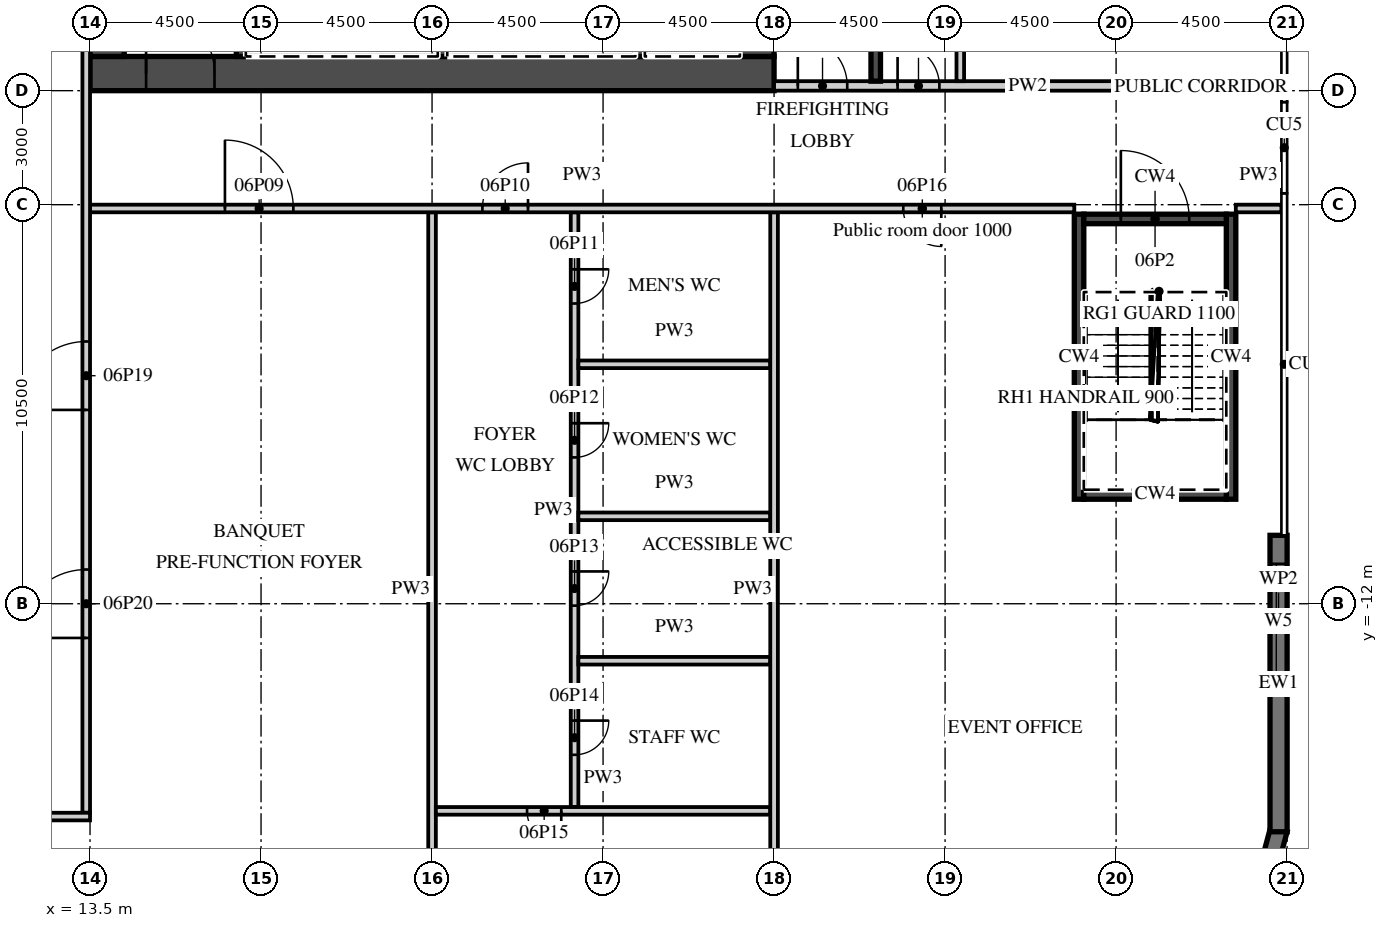
"""IFC4 building model, lengths in metres.
Left out: names, types, materials, properties, quantities, classifications, styles, units other than length and angle.
Written with IfcOpenShell. Run it as: python <this file> out.ifc"""

import sys

from ifc_helpers import new_model, si_unit, direction, frame, frame_2d, origin, place, context, subcontext, project, spatial, polyline, rectangle, outline, extrude, element, fill, save


model = new_model("IFC4")
c1 = context("Model", 3, precision=1e-05, world=origin(), true_north=direction((0.0, 1.0)))
c2 = subcontext(c1, "Body", "Model", "MODEL_VIEW")
j1 = project(units=[si_unit("LENGTHUNIT", "METRE"), si_unit("PLANEANGLEUNIT", "RADIAN")], contexts=[c1])
p1 = place(None, origin())
s1 = spatial("IfcSite", under=j1, at=p1, CompositionType="ELEMENT")
p2 = place(p1, origin())
s2 = spatial("IfcBuilding", under=s1, at=p2, CompositionType="ELEMENT")
p3 = place(p2, frame((0.0, 0.0, 38.0)))
s3 = spatial("IfcBuildingStorey", under=s2, at=p3, CompositionType="ELEMENT", Elevation=38.0)
p4 = place(p3, frame((44.247, -19.942, 0.0), z_axis=(0.0, 0.0, 1.0), x_axis=(0.25881466832, 0.965926999034, 0.0)))
e1 = element("IfcWall", 1, at=p4, inside=s3, PredefinedType="SOLIDWALL", context=c2, shape_type="SweptSolid", body=[
    extrude(outline(polyline([(-0.0, -0.225), (2.07, -0.225), (1.95, 0.225), (0.12, 0.225), (-0.0, -0.225)])), origin(), (0.0, 0.0, 1.0), 8.7),
])
p5 = place(p3, frame((44.775, -18.0, 0.0), z_axis=(0.0, 0.0, 1.0), x_axis=(0.0, 1.0, 0.0)))
e2 = element("IfcWall", 2, at=p5, inside=s3, PredefinedType="SOLIDWALL", context=c2, shape_type="SweptSolid", body=[
    extrude(rectangle(XDim=7.8, YDim=0.45, at=frame_2d((3.9, 0.0))), origin(), (0.0, 0.0, 1.0), 8.7),
])
p6 = place(p5, frame((4.05, 0.0, 0.9)))
e3 = element("IfcOpeningElement", 3, at=p6, cuts=e2, PredefinedType="OPENING", context=c2, shape_type="SweptSolid", body=[
    extrude(rectangle(XDim=3.0, YDim=1.8, at=frame_2d((1.5, 0.9))), frame((0.0, 0.235, 0.0), z_axis=(0.0, -1.0, 0.0), x_axis=(1.0, 0.0, 0.0)), (0.0, 0.0, 1.0), 0.47),
])
p7 = place(p3, frame((13.5, 1.95, 0.0), z_axis=(0.0, 0.0, 1.0), x_axis=(1.0, 0.0, 0.0)))
e4 = element("IfcWall", 4, at=p7, inside=s3, PredefinedType="SHEAR", context=c2, shape_type="SweptSolid", body=[
    extrude(rectangle(XDim=18.0, YDim=0.9, at=frame_2d((9.0, 0.0))), origin(), (0.0, 0.0, 1.0), 8.7),
])
p8 = place(p7, frame((1.475, 0.0, 0.0)))
e5 = element("IfcOpeningElement", 5, at=p8, cuts=e4, PredefinedType="OPENING", context=c2, shape_type="SweptSolid", body=[
    extrude(rectangle(XDim=1.8, YDim=2.1, at=frame_2d((0.9, 1.05))), frame((0.0, 0.46, 0.0), z_axis=(0.0, -1.0, 0.0), x_axis=(1.0, 0.0, 0.0)), (0.0, 0.0, 1.0), 0.92),
])
p9 = place(p3, frame((31.05, 2.4, 0.0), z_axis=(0.0, 0.0, 1.0), x_axis=(0.0, 1.0, 0.0)))
e6 = element("IfcWall", 6, at=p9, inside=s3, PredefinedType="SHEAR", context=c2, shape_type="SweptSolid", body=[
    extrude(rectangle(XDim=12.8, YDim=0.9, at=frame_2d((6.4, 0.0))), origin(), (0.0, 0.0, 1.0), 8.7),
])
p10 = place(p9, frame((0.2, 0.0, 0.0)))
e7 = element("IfcOpeningElement", 7, at=p10, cuts=e6, PredefinedType="OPENING", context=c2, shape_type="SweptSolid", body=[
    extrude(rectangle(XDim=1.1, YDim=2.1, at=frame_2d((0.55, 1.05))), frame((0.0, 0.46, 0.0), z_axis=(0.0, -1.0, 0.0), x_axis=(1.0, 0.0, 0.0)), (0.0, 0.0, 1.0), 0.92),
])
p11 = place(p3, frame((13.95, 2.4, 0.0), z_axis=(0.0, 0.0, 1.0), x_axis=(0.0, 1.0, 0.0)))
e8 = element("IfcWall", 8, at=p11, inside=s3, PredefinedType="SHEAR", context=c2, shape_type="SweptSolid", body=[
    extrude(rectangle(XDim=12.2, YDim=0.9, at=frame_2d((6.1, 0.0))), origin(), (0.0, 0.0, 1.0), 8.7),
])
p12 = place(p3, frame((17.475, 2.4, 0.0), z_axis=(0.0, 0.0, 1.0), x_axis=(0.0, 1.0, 0.0)))
e9 = element("IfcWall", 9, at=p12, inside=s3, PredefinedType="SHEAR", context=c2, shape_type="SweptSolid", body=[
    extrude(rectangle(XDim=3.15, YDim=0.25, at=frame_2d((1.575, 0.0))), origin(), (0.0, 0.0, 1.0), 8.7),
])
for number, where, z_axis, x_axis in (
    (10, (27.975, 2.4, 0.0), (0.0, 0.0, 1.0), (0.0, 1.0, 0.0)),
    (11, (22.775, 2.4, 0.0), (0.0, 0.0, 1.0), (0.0, 1.0, 0.0)),
):
    element("IfcWall", number, at=place(p3, frame(where, z_axis=z_axis, x_axis=x_axis)), inside=s3, PredefinedType="SHEAR", context=c2, shape_type="SweptSolid", body=[
        extrude(rectangle(XDim=2.9, YDim=0.25, at=frame_2d((1.45, 0.0))), origin(), (0.0, 0.0, 1.0), 8.7),
    ])
p13 = place(p3, frame((31.5, 1.625, 0.0), z_axis=(0.0, 0.0, 1.0), x_axis=(1.0, 0.0, 0.0)))
e12 = element("IfcWall", 12, at=p13, inside=s3, PredefinedType="PARTITIONING", context=c2, shape_type="SweptSolid", body=[
    extrude(rectangle(XDim=13.35, YDim=0.25, at=frame_2d((6.675, 0.0))), origin(), (0.0, 0.0, 1.0), 8.7),
])
p14 = place(p13, frame((0.625, 0.0, 0.0)))
e13 = element("IfcOpeningElement", 13, at=p14, cuts=e12, PredefinedType="OPENING", context=c2, shape_type="SweptSolid", body=[
    extrude(rectangle(XDim=1.3, YDim=2.1, at=frame_2d((0.65, 1.05))), frame((0.0, 0.135, 0.0), z_axis=(0.0, -1.0, 0.0), x_axis=(1.0, 0.0, 0.0)), (0.0, 0.0, 1.0), 0.27),
])
p15 = place(p13, frame((3.25, 0.0, 0.0)))
e14 = element("IfcOpeningElement", 14, at=p15, cuts=e12, PredefinedType="OPENING", context=c2, shape_type="SweptSolid", body=[
    extrude(rectangle(XDim=1.1, YDim=2.1, at=frame_2d((0.55, 1.05))), frame((0.0, 0.135, 0.0), z_axis=(0.0, -1.0, 0.0), x_axis=(1.0, 0.0, 0.0)), (0.0, 0.0, 1.0), 0.27),
])
p16 = place(p3, frame((34.175, 1.75, 0.0), z_axis=(0.0, 0.0, 1.0), x_axis=(0.0, 1.0, 0.0)))
e15 = element("IfcWall", 15, at=p16, inside=s3, PredefinedType="SHEAR", context=c2, shape_type="SweptSolid", body=[
    extrude(rectangle(XDim=8.35, YDim=0.25, at=frame_2d((4.175, 0.0))), origin(), (0.0, 0.0, 1.0), 8.7),
])
p17 = place(p3, frame((36.4, 1.75, 0.0), z_axis=(0.0, 0.0, 1.0), x_axis=(0.0, 1.0, 0.0)))
e16 = element("IfcWall", 16, at=p17, inside=s3, PredefinedType="PARTITIONING", context=c2, shape_type="SweptSolid", body=[
    extrude(rectangle(XDim=15.95, YDim=0.2, at=frame_2d((7.975, 0.0))), origin(), (0.0, 0.0, 1.0), 8.7),
])
p18 = place(p17, frame((14.7, 0.0, 0.0)))
e17 = element("IfcOpeningElement", 17, at=p18, cuts=e16, PredefinedType="OPENING", context=c2, shape_type="SweptSolid", body=[
    extrude(rectangle(XDim=0.9, YDim=2.1, at=frame_2d((0.45, 1.05))), frame((0.0, 0.11, 0.0), z_axis=(0.0, -1.0, 0.0), x_axis=(1.0, 0.0, 0.0)), (0.0, 0.0, 1.0), 0.22),
])
for number, where, z_axis, x_axis in (
    (18, (39.525, -9.25, 0.0), (0.0, 0.0, 1.0), (0.0, 1.0, 0.0)),
    (19, (43.525, -9.25, 0.0), (0.0, 0.0, 1.0), (0.0, 1.0, 0.0)),
):
    element("IfcWall", number, at=place(p3, frame(where, z_axis=z_axis, x_axis=x_axis)), inside=s3, PredefinedType="SHEAR", context=c2, shape_type="SweptSolid", body=[
        extrude(rectangle(XDim=7.5, YDim=0.25, at=frame_2d((3.75, 0.0))), origin(), (0.0, 0.0, 1.0), 8.7),
    ])
p19 = place(p3, frame((39.65, -9.125, 0.0), z_axis=(0.0, 0.0, 1.0), x_axis=(1.0, 0.0, 0.0)))
e20 = element("IfcWall", 20, at=p19, inside=s3, PredefinedType="SHEAR", context=c2, shape_type="SweptSolid", body=[
    extrude(rectangle(XDim=3.75, YDim=0.25, at=frame_2d((1.875, 0.0))), origin(), (0.0, 0.0, 1.0), 8.7),
])
p20 = place(p3, frame((39.65, -1.875, 0.0), z_axis=(0.0, 0.0, 1.0), x_axis=(1.0, 0.0, 0.0)))
e21 = element("IfcWall", 21, at=p20, inside=s3, PredefinedType="SHEAR", context=c2, shape_type="SweptSolid", body=[
    extrude(rectangle(XDim=3.75, YDim=0.25, at=frame_2d((1.875, 0.0))), origin(), (0.0, 0.0, 1.0), 8.7),
])
p21 = place(p20, frame((0.975, 0.0, 0.0)))
e22 = element("IfcOpeningElement", 22, at=p21, cuts=e21, PredefinedType="OPENING", context=c2, shape_type="SweptSolid", body=[
    extrude(rectangle(XDim=1.8, YDim=2.1, at=frame_2d((0.9, 1.05))), frame((0.0, 0.135, 0.0), z_axis=(0.0, -1.0, 0.0), x_axis=(1.0, 0.0, 0.0)), (0.0, 0.0, 1.0), 0.27),
])
p22 = place(p3, frame((22.5, -21.55, 0.0), z_axis=(0.0, 0.0, 1.0), x_axis=(0.0, 1.0, 0.0)))
e23 = element("IfcWall", 23, at=p22, inside=s3, PredefinedType="PARTITIONING", context=c2, shape_type="SweptSolid", body=[
    extrude(rectangle(XDim=19.85, YDim=0.2, at=frame_2d((9.925, 0.0))), origin(), (0.0, 0.0, 1.0), 8.7),
])
p23 = place(p3, frame((26.25, -17.35, 0.0), z_axis=(0.0, 0.0, 1.0), x_axis=(0.0, 1.0, 0.0)))
e24 = element("IfcWall", 24, at=p23, inside=s3, PredefinedType="PARTITIONING", context=c2, shape_type="SweptSolid", body=[
    extrude(rectangle(XDim=15.65, YDim=0.2, at=frame_2d((7.825, 0.0))), origin(), (0.0, 0.0, 1.0), 8.7),
])
p24 = place(p23, frame((13.25, 0.0, 0.0)))
e25 = element("IfcOpeningElement", 25, at=p24, cuts=e24, PredefinedType="OPENING", context=c2, shape_type="SweptSolid", body=[
    extrude(rectangle(XDim=0.9, YDim=2.1, at=frame_2d((0.45, 1.05))), frame((0.0, 0.11, 0.0), z_axis=(0.0, -1.0, 0.0), x_axis=(1.0, 0.0, 0.0)), (0.0, 0.0, 1.0), 0.22),
])
p25 = place(p23, frame((9.2, 0.0, 0.0)))
e26 = element("IfcOpeningElement", 26, at=p25, cuts=e24, PredefinedType="OPENING", context=c2, shape_type="SweptSolid", body=[
    extrude(rectangle(XDim=0.9, YDim=2.1, at=frame_2d((0.45, 1.05))), frame((0.0, 0.11, 0.0), z_axis=(0.0, -1.0, 0.0), x_axis=(1.0, 0.0, 0.0)), (0.0, 0.0, 1.0), 0.22),
])
p26 = place(p23, frame((5.3, 0.0, 0.0)))
e27 = element("IfcOpeningElement", 27, at=p26, cuts=e24, PredefinedType="OPENING", context=c2, shape_type="SweptSolid", body=[
    extrude(rectangle(XDim=0.9, YDim=2.1, at=frame_2d((0.45, 1.05))), frame((0.0, 0.11, 0.0), z_axis=(0.0, -1.0, 0.0), x_axis=(1.0, 0.0, 0.0)), (0.0, 0.0, 1.0), 0.22),
])
p27 = place(p23, frame((1.375, 0.0, 0.0)))
e28 = element("IfcOpeningElement", 28, at=p27, cuts=e24, PredefinedType="OPENING", context=c2, shape_type="SweptSolid", body=[
    extrude(rectangle(XDim=0.9, YDim=2.1, at=frame_2d((0.45, 1.05))), frame((0.0, 0.11, 0.0), z_axis=(0.0, -1.0, 0.0), x_axis=(1.0, 0.0, 0.0)), (0.0, 0.0, 1.0), 0.22),
])
for number, where, z_axis, x_axis in (
    (29, (26.35, -5.7, 0.0), (0.0, 0.0, 1.0), (1.0, 0.0, 0.0)),
    (30, (26.35, -9.7, 0.0), (0.0, 0.0, 1.0), (1.0, 0.0, 0.0)),
    (31, (26.35, -13.5, 0.0), (0.0, 0.0, 1.0), (1.0, 0.0, 0.0)),
):
    element("IfcWall", number, at=place(p3, frame(where, z_axis=z_axis, x_axis=x_axis)), inside=s3, PredefinedType="PARTITIONING", context=c2, shape_type="SweptSolid", body=[
        extrude(rectangle(XDim=5.05, YDim=0.2, at=frame_2d((2.525, 0.0))), origin(), (0.0, 0.0, 1.0), 8.7),
    ])
p28 = place(p3, frame((22.6, -17.45, 0.0), z_axis=(0.0, 0.0, 1.0), x_axis=(1.0, 0.0, 0.0)))
e32 = element("IfcWall", 32, at=p28, inside=s3, PredefinedType="PARTITIONING", context=c2, shape_type="SweptSolid", body=[
    extrude(rectangle(XDim=8.8, YDim=0.2, at=frame_2d((4.4, 0.0))), origin(), (0.0, 0.0, 1.0), 8.7),
])
p29 = place(p28, frame((2.4, 0.0, 0.0)))
e33 = element("IfcOpeningElement", 33, at=p29, cuts=e32, PredefinedType="OPENING", context=c2, shape_type="SweptSolid", body=[
    extrude(rectangle(XDim=0.9, YDim=2.1, at=frame_2d((0.45, 1.05))), frame((0.0, 0.11, 0.0), z_axis=(0.0, -1.0, 0.0), x_axis=(1.0, 0.0, 0.0)), (0.0, 0.0, 1.0), 0.22),
])
p30 = place(p3, frame((31.5, -21.55, 0.0), z_axis=(0.0, 0.0, 1.0), x_axis=(0.0, 1.0, 0.0)))
e34 = element("IfcWall", 34, at=p30, inside=s3, PredefinedType="PARTITIONING", context=c2, shape_type="SweptSolid", body=[
    extrude(rectangle(XDim=19.85, YDim=0.2, at=frame_2d((9.925, 0.0))), origin(), (0.0, 0.0, 1.0), 8.7),
])
p31 = place(p3, frame((13.5, -1.6, 0.0), z_axis=(0.0, 0.0, 1.0), x_axis=(1.0, 0.0, 0.0)))
e35 = element("IfcWall", 35, at=p31, inside=s3, PredefinedType="PARTITIONING", context=c2, shape_type="SweptSolid", body=[
    extrude(rectangle(XDim=25.9, YDim=0.2, at=frame_2d((12.95, 0.0))), origin(), (0.0, 0.0, 1.0), 8.7),
])
p32 = place(p31, frame((3.55, 0.0, 0.0)))
e36 = element("IfcOpeningElement", 36, at=p32, cuts=e35, PredefinedType="OPENING", context=c2, shape_type="SweptSolid", body=[
    extrude(rectangle(XDim=1.8, YDim=2.1, at=frame_2d((0.9, 1.05))), frame((0.0, 0.11, 0.0), z_axis=(0.0, -1.0, 0.0), x_axis=(1.0, 0.0, 0.0)), (0.0, 0.0, 1.0), 0.22),
])
p33 = place(p31, frame((10.325, 0.0, 0.0)))
e37 = element("IfcOpeningElement", 37, at=p33, cuts=e35, PredefinedType="OPENING", context=c2, shape_type="SweptSolid", body=[
    extrude(rectangle(XDim=1.2, YDim=2.1, at=frame_2d((0.6, 1.05))), frame((0.0, 0.11, 0.0), z_axis=(0.0, -1.0, 0.0), x_axis=(1.0, 0.0, 0.0)), (0.0, 0.0, 1.0), 0.22),
])
p34 = place(p31, frame((21.4, 0.0, 0.0)))
e38 = element("IfcOpeningElement", 38, at=p34, cuts=e35, PredefinedType="OPENING", context=c2, shape_type="SweptSolid", body=[
    extrude(rectangle(XDim=1.0, YDim=2.1, at=frame_2d((0.5, 1.05))), frame((0.0, 0.11, 0.0), z_axis=(0.0, -1.0, 0.0), x_axis=(1.0, 0.0, 0.0)), (0.0, 0.0, 1.0), 0.22),
])
p35 = place(p3, frame((43.65, -1.6, 0.0), z_axis=(0.0, 0.0, 1.0), x_axis=(1.0, 0.0, 0.0)))
e39 = element("IfcWall", 39, at=p35, inside=s3, PredefinedType="PARTITIONING", context=c2, shape_type="SweptSolid", body=[
    extrude(rectangle(XDim=1.2, YDim=0.2, at=frame_2d((0.6, 0.0))), origin(), (0.0, 0.0, 1.0), 8.7),
])
p36 = place(p3, frame((13.4, -17.5, 0.0), z_axis=(0.0, 0.0, 1.0), x_axis=(0.0, 1.0, 0.0)))
e40 = element("IfcWall", 40, at=p36, inside=s3, PredefinedType="PARTITIONING", context=c2, shape_type="SweptSolid", body=[
    extrude(rectangle(XDim=35.0, YDim=0.2, at=frame_2d((17.5, 0.0))), origin(), (0.0, 0.0, 1.0), 8.7),
])
p37 = place(p36, frame((10.6, 0.0, 0.0)))
e41 = element("IfcOpeningElement", 41, at=p37, cuts=e40, PredefinedType="OPENING", context=c2, shape_type="SweptSolid", body=[
    extrude(rectangle(XDim=1.8, YDim=2.1, at=frame_2d((0.9, 1.05))), frame((0.0, 0.11, 0.0), z_axis=(0.0, -1.0, 0.0), x_axis=(1.0, 0.0, 0.0)), (0.0, 0.0, 1.0), 0.22),
])
p38 = place(p36, frame((4.6, 0.0, 0.0)))
e42 = element("IfcOpeningElement", 42, at=p38, cuts=e40, PredefinedType="OPENING", context=c2, shape_type="SweptSolid", body=[
    extrude(rectangle(XDim=1.8, YDim=2.1, at=frame_2d((0.9, 1.05))), frame((0.0, 0.11, 0.0), z_axis=(0.0, -1.0, 0.0), x_axis=(1.0, 0.0, 0.0)), (0.0, 0.0, 1.0), 0.22),
])
p39 = place(p3, frame((-13.5, -17.6, 0.0), z_axis=(0.0, 0.0, 1.0), x_axis=(1.0, 0.0, 0.0)))
e43 = element("IfcWall", 43, at=p39, inside=s3, PredefinedType="PARTITIONING", context=c2, shape_type="SweptSolid", body=[
    extrude(rectangle(XDim=27.0, YDim=0.2, at=frame_2d((13.5, 0.0))), origin(), (0.0, 0.0, 1.0), 8.7),
])
p40 = place(p39, frame((4.6, 0.0, 0.0)))
e44 = element("IfcOpeningElement", 44, at=p40, cuts=e43, PredefinedType="OPENING", context=c2, shape_type="SweptSolid", body=[
    extrude(rectangle(XDim=1.8, YDim=2.1, at=frame_2d((0.9, 1.05))), frame((0.0, 0.11, 0.0), z_axis=(0.0, -1.0, 0.0), x_axis=(1.0, 0.0, 0.0)), (0.0, 0.0, 1.0), 0.22),
])
p41 = place(p39, frame((12.6, 0.0, 0.0)))
e45 = element("IfcOpeningElement", 45, at=p41, cuts=e43, PredefinedType="OPENING", context=c2, shape_type="SweptSolid", body=[
    extrude(rectangle(XDim=1.8, YDim=2.1, at=frame_2d((0.9, 1.05))), frame((0.0, 0.11, 0.0), z_axis=(0.0, -1.0, 0.0), x_axis=(1.0, 0.0, 0.0)), (0.0, 0.0, 1.0), 0.22),
])
p42 = place(p39, frame((20.6, 0.0, 0.0)))
e46 = element("IfcOpeningElement", 46, at=p42, cuts=e43, PredefinedType="OPENING", context=c2, shape_type="SweptSolid", body=[
    extrude(rectangle(XDim=1.8, YDim=2.1, at=frame_2d((0.9, 1.05))), frame((0.0, 0.11, 0.0), z_axis=(0.0, -1.0, 0.0), x_axis=(1.0, 0.0, 0.0)), (0.0, 0.0, 1.0), 0.22),
])
p43 = place(p6, origin())
e47 = element("IfcWindow", 47, at=p43, inside=s3, PartitioningType="SINGLE_PANEL", PredefinedType="WINDOW", context=c2, shape_type="SweptSolid", body=[
    extrude(rectangle(XDim=3.0, YDim=1.8, at=frame_2d((1.5, 0.9))), frame((0.0, 0.09, 0.0), z_axis=(0.0, -1.0, 0.0), x_axis=(1.0, 0.0, 0.0)), (0.0, 0.0, 1.0), 0.06),
])
fill(e3, e47)
p44 = place(p8, origin())
e48 = element("IfcDoor", 48, at=p44, inside=s3, OperationType="DOUBLE_DOOR_DOUBLE_SWING", PredefinedType="DOOR", context=c2, shape_type="SweptSolid", body=[
    extrude(rectangle(XDim=1.8, YDim=2.1, at=frame_2d((0.9, 1.05))), frame((0.0, 0.025, 0.0), z_axis=(0.0, -1.0, 0.0), x_axis=(1.0, 0.0, 0.0)), (0.0, 0.0, 1.0), 0.05),
])
fill(e5, e48)
p45 = place(p14, origin())
e49 = element("IfcDoor", 49, at=p45, inside=s3, OperationType="SINGLE_SWING_LEFT", PredefinedType="DOOR", context=c2, shape_type="SweptSolid", body=[
    extrude(rectangle(XDim=1.3, YDim=2.1, at=frame_2d((0.65, 1.05))), frame((0.0, 0.025, 0.0), z_axis=(0.0, -1.0, 0.0), x_axis=(1.0, 0.0, 0.0)), (0.0, 0.0, 1.0), 0.05),
])
fill(e13, e49)
p46 = place(p15, origin())
e50 = element("IfcDoor", 50, at=p46, inside=s3, OperationType="SINGLE_SWING_LEFT", PredefinedType="DOOR", context=c2, shape_type="SweptSolid", body=[
    extrude(rectangle(XDim=1.1, YDim=2.1, at=frame_2d((0.55, 1.05))), frame((0.0, 0.025, 0.0), z_axis=(0.0, -1.0, 0.0), x_axis=(1.0, 0.0, 0.0)), (0.0, 0.0, 1.0), 0.05),
])
fill(e14, e50)
p47 = place(p21, origin())
e51 = element("IfcDoor", 51, at=p47, inside=s3, OperationType="DOUBLE_DOOR_DOUBLE_SWING", PredefinedType="DOOR", context=c2, shape_type="SweptSolid", body=[
    extrude(rectangle(XDim=1.8, YDim=2.1, at=frame_2d((0.9, 1.05))), frame((0.0, 0.025, 0.0), z_axis=(0.0, -1.0, 0.0), x_axis=(1.0, 0.0, 0.0)), (0.0, 0.0, 1.0), 0.05),
])
fill(e22, e51)
p48 = place(p32, origin())
e52 = element("IfcDoor", 52, at=p48, inside=s3, OperationType="DOUBLE_DOOR_DOUBLE_SWING", PredefinedType="DOOR", context=c2, shape_type="SweptSolid", body=[
    extrude(rectangle(XDim=1.8, YDim=2.1, at=frame_2d((0.9, 1.05))), frame((0.0, 0.025, 0.0), z_axis=(0.0, -1.0, 0.0), x_axis=(1.0, 0.0, 0.0)), (0.0, 0.0, 1.0), 0.05),
])
fill(e36, e52)
p49 = place(p33, origin())
e53 = element("IfcDoor", 53, at=p49, inside=s3, OperationType="SINGLE_SWING_RIGHT", PredefinedType="DOOR", context=c2, shape_type="SweptSolid", body=[
    extrude(rectangle(XDim=1.2, YDim=2.1, at=frame_2d((0.6, 1.05))), frame((0.0, 0.025, 0.0), z_axis=(0.0, -1.0, 0.0), x_axis=(1.0, 0.0, 0.0)), (0.0, 0.0, 1.0), 0.05),
])
fill(e37, e53)
p50 = place(p24, origin())
e54 = element("IfcDoor", 54, at=p50, inside=s3, OperationType="SINGLE_SWING_RIGHT", PredefinedType="DOOR", context=c2, shape_type="SweptSolid", body=[
    extrude(rectangle(XDim=0.9, YDim=2.1, at=frame_2d((0.45, 1.05))), frame((0.0, 0.025, 0.0), z_axis=(0.0, -1.0, 0.0), x_axis=(1.0, 0.0, 0.0)), (0.0, 0.0, 1.0), 0.05),
])
fill(e25, e54)
p51 = place(p25, origin())
e55 = element("IfcDoor", 55, at=p51, inside=s3, OperationType="SINGLE_SWING_RIGHT", PredefinedType="DOOR", context=c2, shape_type="SweptSolid", body=[
    extrude(rectangle(XDim=0.9, YDim=2.1, at=frame_2d((0.45, 1.05))), frame((0.0, 0.025, 0.0), z_axis=(0.0, -1.0, 0.0), x_axis=(1.0, 0.0, 0.0)), (0.0, 0.0, 1.0), 0.05),
])
fill(e26, e55)
p52 = place(p26, origin())
e56 = element("IfcDoor", 56, at=p52, inside=s3, OperationType="SINGLE_SWING_RIGHT", PredefinedType="DOOR", context=c2, shape_type="SweptSolid", body=[
    extrude(rectangle(XDim=0.9, YDim=2.1, at=frame_2d((0.45, 1.05))), frame((0.0, 0.025, 0.0), z_axis=(0.0, -1.0, 0.0), x_axis=(1.0, 0.0, 0.0)), (0.0, 0.0, 1.0), 0.05),
])
fill(e27, e56)
p53 = place(p27, origin())
e57 = element("IfcDoor", 57, at=p53, inside=s3, OperationType="SINGLE_SWING_RIGHT", PredefinedType="DOOR", context=c2, shape_type="SweptSolid", body=[
    extrude(rectangle(XDim=0.9, YDim=2.1, at=frame_2d((0.45, 1.05))), frame((0.0, 0.025, 0.0), z_axis=(0.0, -1.0, 0.0), x_axis=(1.0, 0.0, 0.0)), (0.0, 0.0, 1.0), 0.05),
])
fill(e28, e57)
p54 = place(p29, origin())
e58 = element("IfcDoor", 58, at=p54, inside=s3, OperationType="SINGLE_SWING_RIGHT", PredefinedType="DOOR", context=c2, shape_type="SweptSolid", body=[
    extrude(rectangle(XDim=0.9, YDim=2.1, at=frame_2d((0.45, 1.05))), frame((0.0, 0.025, 0.0), z_axis=(0.0, -1.0, 0.0), x_axis=(1.0, 0.0, 0.0)), (0.0, 0.0, 1.0), 0.05),
])
fill(e33, e58)
p55 = place(p34, origin())
e59 = element("IfcDoor", 59, at=p55, inside=s3, OperationType="SINGLE_SWING_RIGHT", PredefinedType="DOOR", context=c2, shape_type="SweptSolid", body=[
    extrude(rectangle(XDim=1.0, YDim=2.1, at=frame_2d((0.5, 1.05))), frame((0.0, 0.025, 0.0), z_axis=(0.0, -1.0, 0.0), x_axis=(1.0, 0.0, 0.0)), (0.0, 0.0, 1.0), 0.05),
])
fill(e38, e59)
p56 = place(p37, origin())
e60 = element("IfcDoor", 60, at=p56, inside=s3, OperationType="DOUBLE_DOOR_DOUBLE_SWING", PredefinedType="DOOR", context=c2, shape_type="SweptSolid", body=[
    extrude(rectangle(XDim=1.8, YDim=2.1, at=frame_2d((0.9, 1.05))), frame((0.0, 0.025, 0.0), z_axis=(0.0, -1.0, 0.0), x_axis=(1.0, 0.0, 0.0)), (0.0, 0.0, 1.0), 0.05),
])
fill(e41, e60)
p57 = place(p38, origin())
e61 = element("IfcDoor", 61, at=p57, inside=s3, OperationType="DOUBLE_DOOR_DOUBLE_SWING", PredefinedType="DOOR", context=c2, shape_type="SweptSolid", body=[
    extrude(rectangle(XDim=1.8, YDim=2.1, at=frame_2d((0.9, 1.05))), frame((0.0, 0.025, 0.0), z_axis=(0.0, -1.0, 0.0), x_axis=(1.0, 0.0, 0.0)), (0.0, 0.0, 1.0), 0.05),
])
fill(e42, e61)
save(model, sys.argv[1])
